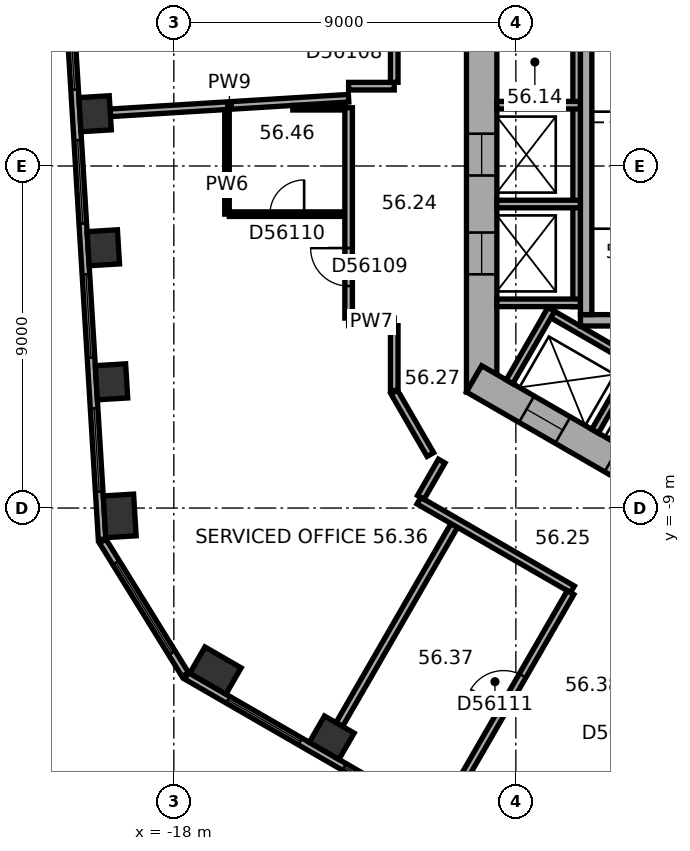
"""IFC4 building model, lengths in metres.
Left out: names, types, materials, properties, quantities, classifications, styles, units other than length and angle.
Written with IfcOpenShell. Run it as: python <this file> out.ifc"""

import sys

from ifc_helpers import new_model, si_unit, direction, frame, frame_2d, origin, origin_2d, place, context, subcontext, project, spatial, rectangle, extrude, element, fill, save


model = new_model("IFC4")
c1 = context("Model", 3, precision=1e-05, world=origin(), true_north=direction((0.0, 1.0)))
c2 = subcontext(c1, "Body", "Model", "MODEL_VIEW")
j1 = project(units=[si_unit("LENGTHUNIT", "METRE"), si_unit("PLANEANGLEUNIT", "RADIAN")], contexts=[c1])
p1 = place(None, origin())
s1 = spatial("IfcSite", under=j1, at=p1, CompositionType="ELEMENT")
p2 = place(p1, origin())
s2 = spatial("IfcBuilding", under=s1, at=p2, CompositionType="ELEMENT")
p3 = place(p2, frame((0.0, 0.0, 229.1)))
s3 = spatial("IfcBuildingStorey", under=s2, at=p3, CompositionType="ELEMENT", Elevation=229.1)
for number, where, z_axis, x_axis in (
    (1, (-20.071, 1.375, 0.0), (0.0, 0.0, 1.0), (0.061, -0.998, 0.0)),
    (2, (-19.856, -2.152, 0.0), (0.0, 0.0, 1.0), (0.061, -0.998, 0.0)),
    (3, (-19.64, -5.679, 0.0), (0.0, 0.0, 1.0), (0.061, -0.998, 0.0)),
):
    element("IfcColumn", number, at=place(p3, frame(where, z_axis=z_axis, x_axis=x_axis)), inside=s3, PredefinedType="COLUMN", context=c2, shape_type="SweptSolid", body=[
        extrude(rectangle(XDim=0.9, YDim=0.8, at=origin_2d()), origin(), (0.0, 0.0, 1.0), 3.7),
    ])
for number, where, z_axis, x_axis in (
    (4, (-19.424, -9.206, 0.0), (0.0, 0.0, 1.0), (0.061, -0.998, 0.0)),
    (5, (-16.906, -13.276, 0.0), (0.0, 0.0, 1.0), (0.866, -0.5, 0.0)),
):
    element("IfcColumn", number, at=place(p3, frame(where, z_axis=z_axis, x_axis=x_axis)), inside=s3, PredefinedType="COLUMN", context=c2, shape_type="SweptSolid", body=[
        extrude(rectangle(XDim=1.1, YDim=0.8, at=origin_2d()), origin(), (0.0, 0.0, 1.0), 3.7),
    ])
p4 = place(p3, frame((-13.845, -15.042, 0.0), z_axis=(0.0, 0.0, 1.0), x_axis=(0.866025403784, -0.5, 0.0)))
e6 = element("IfcColumn", 6, at=p4, inside=s3, PredefinedType="COLUMN", context=c2, shape_type="SweptSolid", body=[
    extrude(rectangle(XDim=0.9, YDim=0.8, at=origin_2d()), origin(), (0.0, 0.0, 1.0), 3.7),
])
p5 = place(p3, frame((-9.9, 5.947, 0.0), z_axis=(0.0, 0.0, 1.0), x_axis=(0.0, -1.0, 0.0)))
e7 = element("IfcWall", 7, at=p5, inside=s3, PredefinedType="SHEAR", context=c2, shape_type="SweptSolid", body=[
    extrude(rectangle(XDim=11.894, YDim=0.8, at=frame_2d((5.947, 0.0))), origin(), (0.0, 0.0, 1.0), 3.7),
])
p6 = place(p5, frame((5.097, 0.0, 0.0)))
e8 = element("IfcOpeningElement", 8, at=p6, cuts=e7, PredefinedType="OPENING", context=c2, shape_type="SweptSolid", body=[
    extrude(rectangle(XDim=1.1, YDim=2.1, at=frame_2d((0.55, 1.05))), frame((0.0, 0.41, 0.0), z_axis=(0.0, -1.0, 0.0), x_axis=(1.0, 0.0, 0.0)), (0.0, 0.0, 1.0), 0.82),
])
p7 = place(p5, frame((7.697, 0.0, 0.0)))
e9 = element("IfcOpeningElement", 9, at=p7, cuts=e7, PredefinedType="OPENING", context=c2, shape_type="SweptSolid", body=[
    extrude(rectangle(XDim=1.1, YDim=2.1, at=frame_2d((0.55, 1.05))), frame((0.0, 0.41, 0.0), z_axis=(0.0, -1.0, 0.0), x_axis=(1.0, 0.0, 0.0)), (0.0, 0.0, 1.0), 0.82),
])
p8 = place(p3, frame((-10.1, -5.6, 0.0), z_axis=(0.0, 0.0, 1.0), x_axis=(0.866023897231, -0.500002609418, 0.0)))
e10 = element("IfcWall", 10, at=p8, inside=s3, PredefinedType="SHEAR", context=c2, shape_type="SweptSolid", body=[
    extrude(rectangle(XDim=11.894, YDim=0.8, at=frame_2d((5.947, 0.0))), origin(), (0.0, 0.0, 1.0), 3.7),
])
p9 = place(p8, frame((6.147, 0.0, 0.0)))
e11 = element("IfcOpeningElement", 11, at=p9, cuts=e10, PredefinedType="OPENING", context=c2, shape_type="SweptSolid", body=[
    extrude(rectangle(XDim=1.5, YDim=2.1, at=frame_2d((0.75, 1.05))), frame((0.0, 0.41, 0.0), z_axis=(0.0, -1.0, 0.0), x_axis=(1.0, 0.0, 0.0)), (0.0, 0.0, 1.0), 0.82),
])
p10 = place(p8, frame((1.597, 0.0, 0.0)))
e12 = element("IfcOpeningElement", 12, at=p10, cuts=e10, PredefinedType="OPENING", context=c2, shape_type="SweptSolid", body=[
    extrude(rectangle(XDim=1.1, YDim=2.1, at=frame_2d((0.55, 1.05))), frame((0.0, 0.41, 0.0), z_axis=(0.0, -1.0, 0.0), x_axis=(1.0, 0.0, 0.0)), (0.0, 0.0, 1.0), 0.82),
])
p11 = place(p8, frame((4.197, 0.0, 0.0)))
e13 = element("IfcOpeningElement", 13, at=p11, cuts=e10, PredefinedType="OPENING", context=c2, shape_type="SweptSolid", body=[
    extrude(rectangle(XDim=1.1, YDim=2.1, at=frame_2d((0.55, 1.05))), frame((0.0, 0.41, 0.0), z_axis=(0.0, -1.0, 0.0), x_axis=(1.0, 0.0, 0.0)), (0.0, 0.0, 1.0), 0.82),
])
p12 = place(p3, frame((-21.038, 8.984, 0.0), z_axis=(0.0, 0.0, 1.0), x_axis=(0.061043935634, -0.998135079998, 0.0)))
e14 = element("IfcWall", 14, at=p12, inside=s3, PredefinedType="STANDARD", context=c2, shape_type="SweptSolid", body=[
    extrude(rectangle(XDim=18.841, YDim=0.2, at=frame_2d((9.421, 0.0))), origin(), (0.0, 0.0, 1.0), 3.7),
])
p13 = place(p12, frame((1.253, 0.0, 0.9)))
e15 = element("IfcOpeningElement", 15, at=p13, cuts=e14, PredefinedType="OPENING", context=c2, shape_type="SweptSolid", body=[
    extrude(rectangle(XDim=2.2, YDim=2.0, at=frame_2d((1.1, 1.0))), frame((0.0, 0.11, 0.0), z_axis=(0.0, -1.0, 0.0), x_axis=(1.0, 0.0, 0.0)), (0.0, 0.0, 1.0), 0.22),
])
p14 = place(p12, frame((4.786, 0.0, 0.9)))
e16 = element("IfcOpeningElement", 16, at=p14, cuts=e14, PredefinedType="OPENING", context=c2, shape_type="SweptSolid", body=[
    extrude(rectangle(XDim=2.2, YDim=2.0, at=frame_2d((1.1, 1.0))), frame((0.0, 0.11, 0.0), z_axis=(0.0, -1.0, 0.0), x_axis=(1.0, 0.0, 0.0)), (0.0, 0.0, 1.0), 0.22),
])
p15 = place(p12, frame((8.32, 0.0, 0.9)))
e17 = element("IfcOpeningElement", 17, at=p15, cuts=e14, PredefinedType="OPENING", context=c2, shape_type="SweptSolid", body=[
    extrude(rectangle(XDim=2.2, YDim=2.0, at=frame_2d((1.1, 1.0))), frame((0.0, 0.11, 0.0), z_axis=(0.0, -1.0, 0.0), x_axis=(1.0, 0.0, 0.0)), (0.0, 0.0, 1.0), 0.22),
])
p16 = place(p12, frame((11.854, 0.0, 0.9)))
e18 = element("IfcOpeningElement", 18, at=p16, cuts=e14, PredefinedType="OPENING", context=c2, shape_type="SweptSolid", body=[
    extrude(rectangle(XDim=2.2, YDim=2.0, at=frame_2d((1.1, 1.0))), frame((0.0, 0.11, 0.0), z_axis=(0.0, -1.0, 0.0), x_axis=(1.0, 0.0, 0.0)), (0.0, 0.0, 1.0), 0.22),
])
p17 = place(p12, frame((15.387, 0.0, 0.9)))
e19 = element("IfcOpeningElement", 19, at=p17, cuts=e14, PredefinedType="OPENING", context=c2, shape_type="SweptSolid", body=[
    extrude(rectangle(XDim=2.2, YDim=2.0, at=frame_2d((1.1, 1.0))), frame((0.0, 0.11, 0.0), z_axis=(0.0, -1.0, 0.0), x_axis=(1.0, 0.0, 0.0)), (0.0, 0.0, 1.0), 0.22),
])
p18 = place(p3, frame((-19.873, -9.869, 0.0), z_axis=(0.0, 0.0, 1.0), x_axis=(0.52626914263, -0.850318051975, 0.0)))
e20 = element("IfcWall", 20, at=p18, inside=s3, PredefinedType="STANDARD", context=c2, shape_type="SweptSolid", body=[
    extrude(rectangle(XDim=4.13, YDim=0.2, at=frame_2d((2.065, 0.0))), origin(), (0.0, 0.0, 1.0), 3.7),
])
p19 = place(p18, frame((0.665, 0.0, 0.9)))
e21 = element("IfcOpeningElement", 21, at=p19, cuts=e20, PredefinedType="OPENING", context=c2, shape_type="SweptSolid", body=[
    extrude(rectangle(XDim=2.8, YDim=2.0, at=frame_2d((1.4, 1.0))), frame((0.0, 0.11, 0.0), z_axis=(0.0, -1.0, 0.0), x_axis=(1.0, 0.0, 0.0)), (0.0, 0.0, 1.0), 0.22),
])
p20 = place(p3, frame((-17.664, -13.415, 0.0), z_axis=(0.0, 0.0, 1.0), x_axis=(0.866026555358, -0.49999800541, 0.0)))
e22 = element("IfcWall", 22, at=p20, inside=s3, PredefinedType="STANDARD", context=c2, shape_type="SweptSolid", body=[
    extrude(rectangle(XDim=18.841, YDim=0.2, at=frame_2d((9.421, 0.0))), origin(), (0.0, 0.0, 1.0), 3.7),
])
p21 = place(p20, frame((1.254, 0.0, 0.9)))
e23 = element("IfcOpeningElement", 23, at=p21, cuts=e22, PredefinedType="OPENING", context=c2, shape_type="SweptSolid", body=[
    extrude(rectangle(XDim=2.2, YDim=2.0, at=frame_2d((1.1, 1.0))), frame((0.0, 0.11, 0.0), z_axis=(0.0, -1.0, 0.0), x_axis=(1.0, 0.0, 0.0)), (0.0, 0.0, 1.0), 0.22),
])
p22 = place(p20, frame((4.788, 0.0, 0.9)))
e24 = element("IfcOpeningElement", 24, at=p22, cuts=e22, PredefinedType="OPENING", context=c2, shape_type="SweptSolid", body=[
    extrude(rectangle(XDim=2.2, YDim=2.0, at=frame_2d((1.1, 1.0))), frame((0.0, 0.11, 0.0), z_axis=(0.0, -1.0, 0.0), x_axis=(1.0, 0.0, 0.0)), (0.0, 0.0, 1.0), 0.22),
])
p23 = place(p20, frame((8.322, 0.0, 0.9)))
e25 = element("IfcOpeningElement", 25, at=p23, cuts=e22, PredefinedType="OPENING", context=c2, shape_type="SweptSolid", body=[
    extrude(rectangle(XDim=2.2, YDim=2.0, at=frame_2d((1.1, 1.0))), frame((0.0, 0.11, 0.0), z_axis=(0.0, -1.0, 0.0), x_axis=(1.0, 0.0, 0.0)), (0.0, 0.0, 1.0), 0.22),
])
p24 = place(p20, frame((11.855, 0.0, 0.9)))
e26 = element("IfcOpeningElement", 26, at=p24, cuts=e22, PredefinedType="OPENING", context=c2, shape_type="SweptSolid", body=[
    extrude(rectangle(XDim=2.2, YDim=2.0, at=frame_2d((1.1, 1.0))), frame((0.0, 0.11, 0.0), z_axis=(0.0, -1.0, 0.0), x_axis=(1.0, 0.0, 0.0)), (0.0, 0.0, 1.0), 0.22),
])
p25 = place(p20, frame((15.389, 0.0, 0.9)))
e27 = element("IfcOpeningElement", 27, at=p25, cuts=e22, PredefinedType="OPENING", context=c2, shape_type="SweptSolid", body=[
    extrude(rectangle(XDim=2.2, YDim=2.0, at=frame_2d((1.1, 1.0))), frame((0.0, 0.11, 0.0), z_axis=(0.0, -1.0, 0.0), x_axis=(1.0, 0.0, 0.0)), (0.0, 0.0, 1.0), 0.22),
])
p26 = place(p3, frame((-7.4, 4.3, 0.0), z_axis=(0.0, 0.0, 1.0), x_axis=(0.0, -1.0, 0.0)))
e28 = element("IfcWall", 28, at=p26, inside=s3, PredefinedType="PARTITIONING", context=c2, shape_type="SweptSolid", body=[
    extrude(rectangle(XDim=8.0, YDim=0.2, at=frame_2d((4.0, 0.0))), origin(), (0.0, 0.0, 1.0), 3.42),
])
for number, where, z_axis, x_axis in (
    (29, (-7.3, 1.6, 0.0), (0.0, 0.0, 1.0), (-1.0, 0.0, 0.0)),
    (30, (-7.3, -1.0, 0.0), (0.0, 0.0, 1.0), (-1.0, 0.0, 0.0)),
    (31, (-7.3, -3.6, 0.0), (0.0, 0.0, 1.0), (-1.0, 0.0, 0.0)),
):
    element("IfcWall", number, at=place(p3, frame(where, z_axis=z_axis, x_axis=x_axis)), inside=s3, PredefinedType="PARTITIONING", context=c2, shape_type="SweptSolid", body=[
        extrude(rectangle(XDim=2.2, YDim=0.2, at=frame_2d((1.1, 0.0))), origin(), (0.0, 0.0, 1.0), 3.42),
    ])
p27 = place(p3, frame((-8.203, -3.809, 0.0), z_axis=(0.0, 0.0, 1.0), x_axis=(0.866028230842, -0.499995103361, 0.0)))
e32 = element("IfcWall", 32, at=p27, inside=s3, PredefinedType="PARTITIONING", context=c2, shape_type="SweptSolid", body=[
    extrude(rectangle(XDim=5.4, YDim=0.2, at=frame_2d((2.7, 0.0))), origin(), (0.0, 0.0, 1.0), 3.42),
])
for number, where, z_axis, x_axis in (
    (33, (-8.067, -3.772, 0.0), (0.0, 0.0, 1.0), (-0.5, -0.866, 0.0)),
    (34, (-5.815, -5.072, 0.0), (0.0, 0.0, 1.0), (-0.5, -0.866, 0.0)),
):
    element("IfcWall", number, at=place(p3, frame(where, z_axis=z_axis, x_axis=x_axis)), inside=s3, PredefinedType="PARTITIONING", context=c2, shape_type="SweptSolid", body=[
        extrude(rectangle(XDim=2.2, YDim=0.2, at=frame_2d((1.1, 0.0))), origin(), (0.0, 0.0, 1.0), 3.42),
    ])
p28 = place(p3, frame((-2.6, -4.06, 0.0), z_axis=(0.0, 0.0, 1.0), x_axis=(-1.0, 0.0, 0.0)))
e35 = element("IfcWall", 35, at=p28, inside=s3, PredefinedType="SHEAR", context=c2, shape_type="SweptSolid", body=[
    extrude(rectangle(XDim=4.7, YDim=0.3, at=frame_2d((2.35, 0.0))), origin(), (0.0, 0.0, 1.0), 3.42),
])
p29 = place(p3, frame((-7.15, 3.15, 0.0), z_axis=(0.0, 0.0, 1.0), x_axis=(0.0, -1.0, 0.0)))
e36 = element("IfcWall", 36, at=p29, inside=s3, PredefinedType="SHEAR", context=c2, shape_type="SweptSolid", body=[
    extrude(rectangle(XDim=7.06, YDim=0.3, at=frame_2d((3.53, 0.0))), origin(), (0.0, 0.0, 1.0), 3.42),
])
p30 = place(p3, frame((-19.672, 1.4, 0.0), z_axis=(0.0, 0.0, 1.0), x_axis=(0.99813499784, 0.061045278997, 0.0)))
e37 = element("IfcWall", 37, at=p30, inside=s3, PredefinedType="PARTITIONING", context=c2, shape_type="SweptSolid", body=[
    extrude(rectangle(XDim=6.283, YDim=0.2, at=frame_2d((3.142, 0.0))), origin(), (0.0, 0.0, 1.0), 2.87),
])
p31 = place(p3, frame((-16.601, -1.267, 0.0), z_axis=(0.0, 0.0, 1.0), x_axis=(0.0, 1.0, 0.0)))
e38 = element("IfcWall", 38, at=p31, inside=s3, PredefinedType="PARTITIONING", context=c2, shape_type="SweptSolid", body=[
    extrude(rectangle(XDim=2.75, YDim=0.12, at=frame_2d((1.375, 0.0))), origin(), (0.0, 0.0, 1.0), 3.42),
])
p32 = place(p3, frame((-14.869, 1.533, 0.0), z_axis=(0.0, 0.0, 1.0), x_axis=(1.0, 0.0, 0.0)))
e39 = element("IfcWall", 39, at=p32, inside=s3, PredefinedType="PARTITIONING", context=c2, shape_type="SweptSolid", body=[
    extrude(rectangle(XDim=1.368, YDim=0.12, at=frame_2d((0.684, 0.0))), origin(), (0.0, 0.0, 1.0), 3.42),
])
p33 = place(p3, frame((-13.646, -14.696, 0.0), z_axis=(0.0, 0.0, 1.0), x_axis=(0.500006596359, 0.866021595341, 0.0)))
e40 = element("IfcWall", 40, at=p33, inside=s3, PredefinedType="PARTITIONING", context=c2, shape_type="SweptSolid", body=[
    extrude(rectangle(XDim=6.049, YDim=0.2, at=frame_2d((3.025, 0.0))), origin(), (0.0, 0.0, 1.0), 3.42),
])
p34 = place(p3, frame((-13.501, -1.267, 0.0), z_axis=(0.0, 0.0, 1.0), x_axis=(-1.0, 0.0, 0.0)))
e41 = element("IfcWall", 41, at=p34, inside=s3, PredefinedType="PARTITIONING", context=c2, shape_type="SweptSolid", body=[
    extrude(rectangle(XDim=3.04, YDim=0.12, at=frame_2d((1.52, 0.0))), origin(), (0.0, 0.0, 1.0), 3.42),
])
p35 = place(p34, frame((1.07, 0.0, 0.0)))
e42 = element("IfcOpeningElement", 42, at=p35, cuts=e41, PredefinedType="OPENING", context=c2, shape_type="SweptSolid", body=[
    extrude(rectangle(XDim=0.9, YDim=2.1, at=frame_2d((0.45, 1.05))), frame((0.0, 0.07, 0.0), z_axis=(0.0, -1.0, 0.0), x_axis=(1.0, 0.0, 0.0)), (0.0, 0.0, 1.0), 0.14),
])
p36 = place(p3, frame((-13.401, -4.101, 0.0), z_axis=(0.0, 0.0, 1.0), x_axis=(1.0, 0.0, 0.0)))
e43 = element("IfcWall", 43, at=p36, inside=s3, PredefinedType="PARTITIONING", context=c2, shape_type="SweptSolid", body=[
    extrude(rectangle(XDim=1.201, YDim=0.2, at=frame_2d((0.601, 0.0))), origin(), (0.0, 0.0, 1.0), 3.42),
])
p37 = place(p3, frame((-13.401, 1.533, 0.0), z_axis=(0.0, 0.0, 1.0), x_axis=(0.0, -1.0, 0.0)))
e44 = element("IfcWall", 44, at=p37, inside=s3, PredefinedType="PARTITIONING", context=c2, shape_type="SweptSolid", body=[
    extrude(rectangle(XDim=5.534, YDim=0.2, at=frame_2d((2.767, 0.0))), origin(), (0.0, 0.0, 1.0), 3.42),
])
p38 = place(p37, frame((3.692, 0.0, 0.0)))
e45 = element("IfcOpeningElement", 45, at=p38, cuts=e44, PredefinedType="OPENING", context=c2, shape_type="SweptSolid", body=[
    extrude(rectangle(XDim=1.0, YDim=2.1, at=frame_2d((0.5, 1.05))), frame((0.0, 0.11, 0.0), z_axis=(0.0, -1.0, 0.0), x_axis=(1.0, 0.0, 0.0)), (0.0, 0.0, 1.0), 0.22),
])
p39 = place(p3, frame((-12.2, -5.947, 0.0), z_axis=(0.0, 0.0, 1.0), x_axis=(0.500022797313, -0.86601224135, 0.0)))
e46 = element("IfcWall", 46, at=p39, inside=s3, PredefinedType="PARTITIONING", context=c2, shape_type="SweptSolid", body=[
    extrude(rectangle(XDim=1.9, YDim=0.2, at=frame_2d((0.95, 0.0))), origin(), (0.0, 0.0, 1.0), 3.42),
])
p40 = place(p3, frame((-12.2, -4.201, 0.0), z_axis=(0.0, 0.0, 1.0), x_axis=(0.0, -1.0, 0.0)))
e47 = element("IfcWall", 47, at=p40, inside=s3, PredefinedType="PARTITIONING", context=c2, shape_type="SweptSolid", body=[
    extrude(rectangle(XDim=1.706, YDim=0.2, at=frame_2d((0.853, 0.0))), origin(), (0.0, 0.0, 1.0), 3.42),
])
p41 = place(p3, frame((-12.2, 2.101, 0.0), z_axis=(0.0, 0.0, 1.0), x_axis=(-1.0, 0.0, 0.0)))
e48 = element("IfcWall", 48, at=p41, inside=s3, PredefinedType="PARTITIONING", context=c2, shape_type="SweptSolid", body=[
    extrude(rectangle(XDim=1.201, YDim=0.2, at=frame_2d((0.601, 0.0))), origin(), (0.0, 0.0, 1.0), 3.42),
])
p42 = place(p3, frame((-12.2, 5.697, 0.0), z_axis=(0.0, 0.0, 1.0), x_axis=(0.0, -1.0, 0.0)))
e49 = element("IfcWall", 49, at=p42, inside=s3, PredefinedType="PARTITIONING", context=c2, shape_type="SweptSolid", body=[
    extrude(rectangle(XDim=3.496, YDim=0.2, at=frame_2d((1.748, 0.0))), origin(), (0.0, 0.0, 1.0), 3.42),
])
p43 = place(p3, frame((-11.551, -8.805, 0.0), z_axis=(0.0, 0.0, 1.0), x_axis=(0.866038310922, -0.499977643516, 0.0)))
e50 = element("IfcWall", 50, at=p43, inside=s3, PredefinedType="PARTITIONING", context=c2, shape_type="SweptSolid", body=[
    extrude(rectangle(XDim=4.665, YDim=0.2, at=frame_2d((2.333, 0.0))), origin(), (0.0, 0.0, 1.0), 3.42),
])
p44 = place(p3, frame((-10.951, -7.765, 0.0), z_axis=(0.0, 0.0, 1.0), x_axis=(-0.499978356969, -0.866037899034, 0.0)))
e51 = element("IfcWall", 51, at=p44, inside=s3, PredefinedType="PARTITIONING", context=c2, shape_type="SweptSolid", body=[
    extrude(rectangle(XDim=1.101, YDim=0.2, at=frame_2d((0.551, 0.0))), origin(), (0.0, 0.0, 1.0), 3.42),
])
p45 = place(p3, frame((-10.585, -16.463, 0.0), z_axis=(0.0, 0.0, 1.0), x_axis=(0.499993802756, 0.866028981735, 0.0)))
e52 = element("IfcWall", 52, at=p45, inside=s3, PredefinedType="PARTITIONING", context=c2, shape_type="SweptSolid", body=[
    extrude(rectangle(XDim=6.049, YDim=0.2, at=frame_2d((3.024, 0.0))), origin(), (0.0, 0.0, 1.0), 2.87),
])
p46 = place(p45, frame((2.524, 0.0, 0.0)))
e53 = element("IfcOpeningElement", 53, at=p46, cuts=e52, PredefinedType="OPENING", context=c2, shape_type="SweptSolid", body=[
    extrude(rectangle(XDim=1.0, YDim=2.1, at=frame_2d((0.5, 1.05))), frame((0.0, 0.11, 0.0), z_axis=(0.0, -1.0, 0.0), x_axis=(1.0, 0.0, 0.0)), (0.0, 0.0, 1.0), 0.22),
])
p47 = place(p3, frame((-7.525, -18.23, 0.0), z_axis=(0.0, 0.0, 1.0), x_axis=(0.499983153418, 0.866035129944, 0.0)))
e54 = element("IfcWall", 54, at=p47, inside=s3, PredefinedType="PARTITIONING", context=c2, shape_type="SweptSolid", body=[
    extrude(rectangle(XDim=7.35, YDim=0.2, at=frame_2d((3.675, 0.0))), origin(), (0.0, 0.0, 1.0), 3.42),
])
p48 = place(p47, frame((2.975, 0.0, 0.0)))
e55 = element("IfcOpeningElement", 55, at=p48, cuts=e54, PredefinedType="OPENING", context=c2, shape_type="SweptSolid", body=[
    extrude(rectangle(XDim=1.0, YDim=2.1, at=frame_2d((0.5, 1.05))), frame((0.0, 0.11, 0.0), z_axis=(0.0, -1.0, 0.0), x_axis=(1.0, 0.0, 0.0)), (0.0, 0.0, 1.0), 0.22),
])
p49 = place(p14, origin())
e56 = element("IfcWindow", 56, at=p49, inside=s3, PartitioningType="SINGLE_PANEL", PredefinedType="WINDOW", context=c2, shape_type="SweptSolid", body=[
    extrude(rectangle(XDim=2.2, YDim=2.0, at=frame_2d((1.1, 1.0))), frame((0.0, 0.03, 0.0), z_axis=(0.0, -1.0, 0.0), x_axis=(1.0, 0.0, 0.0)), (0.0, 0.0, 1.0), 0.06),
])
fill(e16, e56)
p50 = place(p15, origin())
e57 = element("IfcWindow", 57, at=p50, inside=s3, PartitioningType="SINGLE_PANEL", PredefinedType="WINDOW", context=c2, shape_type="SweptSolid", body=[
    extrude(rectangle(XDim=2.2, YDim=2.0, at=frame_2d((1.1, 1.0))), frame((0.0, 0.03, 0.0), z_axis=(0.0, -1.0, 0.0), x_axis=(1.0, 0.0, 0.0)), (0.0, 0.0, 1.0), 0.06),
])
fill(e17, e57)
p51 = place(p16, origin())
e58 = element("IfcWindow", 58, at=p51, inside=s3, PartitioningType="SINGLE_PANEL", PredefinedType="WINDOW", context=c2, shape_type="SweptSolid", body=[
    extrude(rectangle(XDim=2.2, YDim=2.0, at=frame_2d((1.1, 1.0))), frame((0.0, 0.03, 0.0), z_axis=(0.0, -1.0, 0.0), x_axis=(1.0, 0.0, 0.0)), (0.0, 0.0, 1.0), 0.06),
])
fill(e18, e58)
p52 = place(p17, origin())
e59 = element("IfcWindow", 59, at=p52, inside=s3, PartitioningType="SINGLE_PANEL", PredefinedType="WINDOW", context=c2, shape_type="SweptSolid", body=[
    extrude(rectangle(XDim=2.2, YDim=2.0, at=frame_2d((1.1, 1.0))), frame((0.0, 0.03, 0.0), z_axis=(0.0, -1.0, 0.0), x_axis=(1.0, 0.0, 0.0)), (0.0, 0.0, 1.0), 0.06),
])
fill(e19, e59)
p53 = place(p19, origin())
e60 = element("IfcWindow", 60, at=p53, inside=s3, PartitioningType="SINGLE_PANEL", PredefinedType="WINDOW", context=c2, shape_type="SweptSolid", body=[
    extrude(rectangle(XDim=2.8, YDim=2.0, at=frame_2d((1.4, 1.0))), frame((0.0, 0.03, 0.0), z_axis=(0.0, -1.0, 0.0), x_axis=(1.0, 0.0, 0.0)), (0.0, 0.0, 1.0), 0.06),
])
fill(e21, e60)
p54 = place(p21, origin())
e61 = element("IfcWindow", 61, at=p54, inside=s3, PartitioningType="SINGLE_PANEL", PredefinedType="WINDOW", context=c2, shape_type="SweptSolid", body=[
    extrude(rectangle(XDim=2.2, YDim=2.0, at=frame_2d((1.1, 1.0))), frame((0.0, 0.03, 0.0), z_axis=(0.0, -1.0, 0.0), x_axis=(1.0, 0.0, 0.0)), (0.0, 0.0, 1.0), 0.06),
])
fill(e23, e61)
p55 = place(p22, origin())
e62 = element("IfcWindow", 62, at=p55, inside=s3, PartitioningType="SINGLE_PANEL", PredefinedType="WINDOW", context=c2, shape_type="SweptSolid", body=[
    extrude(rectangle(XDim=2.2, YDim=2.0, at=frame_2d((1.1, 1.0))), frame((0.0, 0.03, 0.0), z_axis=(0.0, -1.0, 0.0), x_axis=(1.0, 0.0, 0.0)), (0.0, 0.0, 1.0), 0.06),
])
fill(e24, e62)
p56 = place(p6, origin())
e63 = element("IfcDoor", 63, at=p56, inside=s3, OperationType="DOUBLE_DOOR_SLIDING", PredefinedType="DOOR", context=c2, shape_type="SweptSolid", body=[
    extrude(rectangle(XDim=1.1, YDim=2.1, at=frame_2d((0.55, 1.05))), frame((0.0, 0.025, 0.0), z_axis=(0.0, -1.0, 0.0), x_axis=(1.0, 0.0, 0.0)), (0.0, 0.0, 1.0), 0.05),
])
fill(e8, e63)
p57 = place(p7, origin())
e64 = element("IfcDoor", 64, at=p57, inside=s3, OperationType="DOUBLE_DOOR_SLIDING", PredefinedType="DOOR", context=c2, shape_type="SweptSolid", body=[
    extrude(rectangle(XDim=1.1, YDim=2.1, at=frame_2d((0.55, 1.05))), frame((0.0, 0.025, 0.0), z_axis=(0.0, -1.0, 0.0), x_axis=(1.0, 0.0, 0.0)), (0.0, 0.0, 1.0), 0.05),
])
fill(e9, e64)
p58 = place(p10, origin())
e65 = element("IfcDoor", 65, at=p58, inside=s3, OperationType="DOUBLE_DOOR_SLIDING", PredefinedType="DOOR", context=c2, shape_type="SweptSolid", body=[
    extrude(rectangle(XDim=1.1, YDim=2.1, at=frame_2d((0.55, 1.05))), frame((0.0, 0.025, 0.0), z_axis=(0.0, -1.0, 0.0), x_axis=(1.0, 0.0, 0.0)), (0.0, 0.0, 1.0), 0.05),
])
fill(e12, e65)
p59 = place(p38, origin())
e66 = element("IfcDoor", 66, at=p59, inside=s3, OperationType="SINGLE_SWING_LEFT", PredefinedType="DOOR", context=c2, shape_type="SweptSolid", body=[
    extrude(rectangle(XDim=1.0, YDim=2.1, at=frame_2d((0.5, 1.05))), frame((0.0, 0.025, 0.0), z_axis=(0.0, -1.0, 0.0), x_axis=(1.0, 0.0, 0.0)), (0.0, 0.0, 1.0), 0.05),
])
fill(e45, e66)
p60 = place(p35, origin())
e67 = element("IfcDoor", 67, at=p60, inside=s3, OperationType="SINGLE_SWING_LEFT", PredefinedType="DOOR", context=c2, shape_type="SweptSolid", body=[
    extrude(rectangle(XDim=0.9, YDim=2.1, at=frame_2d((0.45, 1.05))), frame((0.0, 0.025, 0.0), z_axis=(0.0, -1.0, 0.0), x_axis=(1.0, 0.0, 0.0)), (0.0, 0.0, 1.0), 0.05),
])
fill(e42, e67)
p61 = place(p46, origin())
e68 = element("IfcDoor", 68, at=p61, inside=s3, OperationType="SINGLE_SWING_LEFT", PredefinedType="DOOR", context=c2, shape_type="SweptSolid", body=[
    extrude(rectangle(XDim=1.0, YDim=2.1, at=frame_2d((0.5, 1.05))), frame((0.0, 0.025, 0.0), z_axis=(0.0, -1.0, 0.0), x_axis=(1.0, 0.0, 0.0)), (0.0, 0.0, 1.0), 0.05),
])
fill(e53, e68)
save(model, sys.argv[1])
